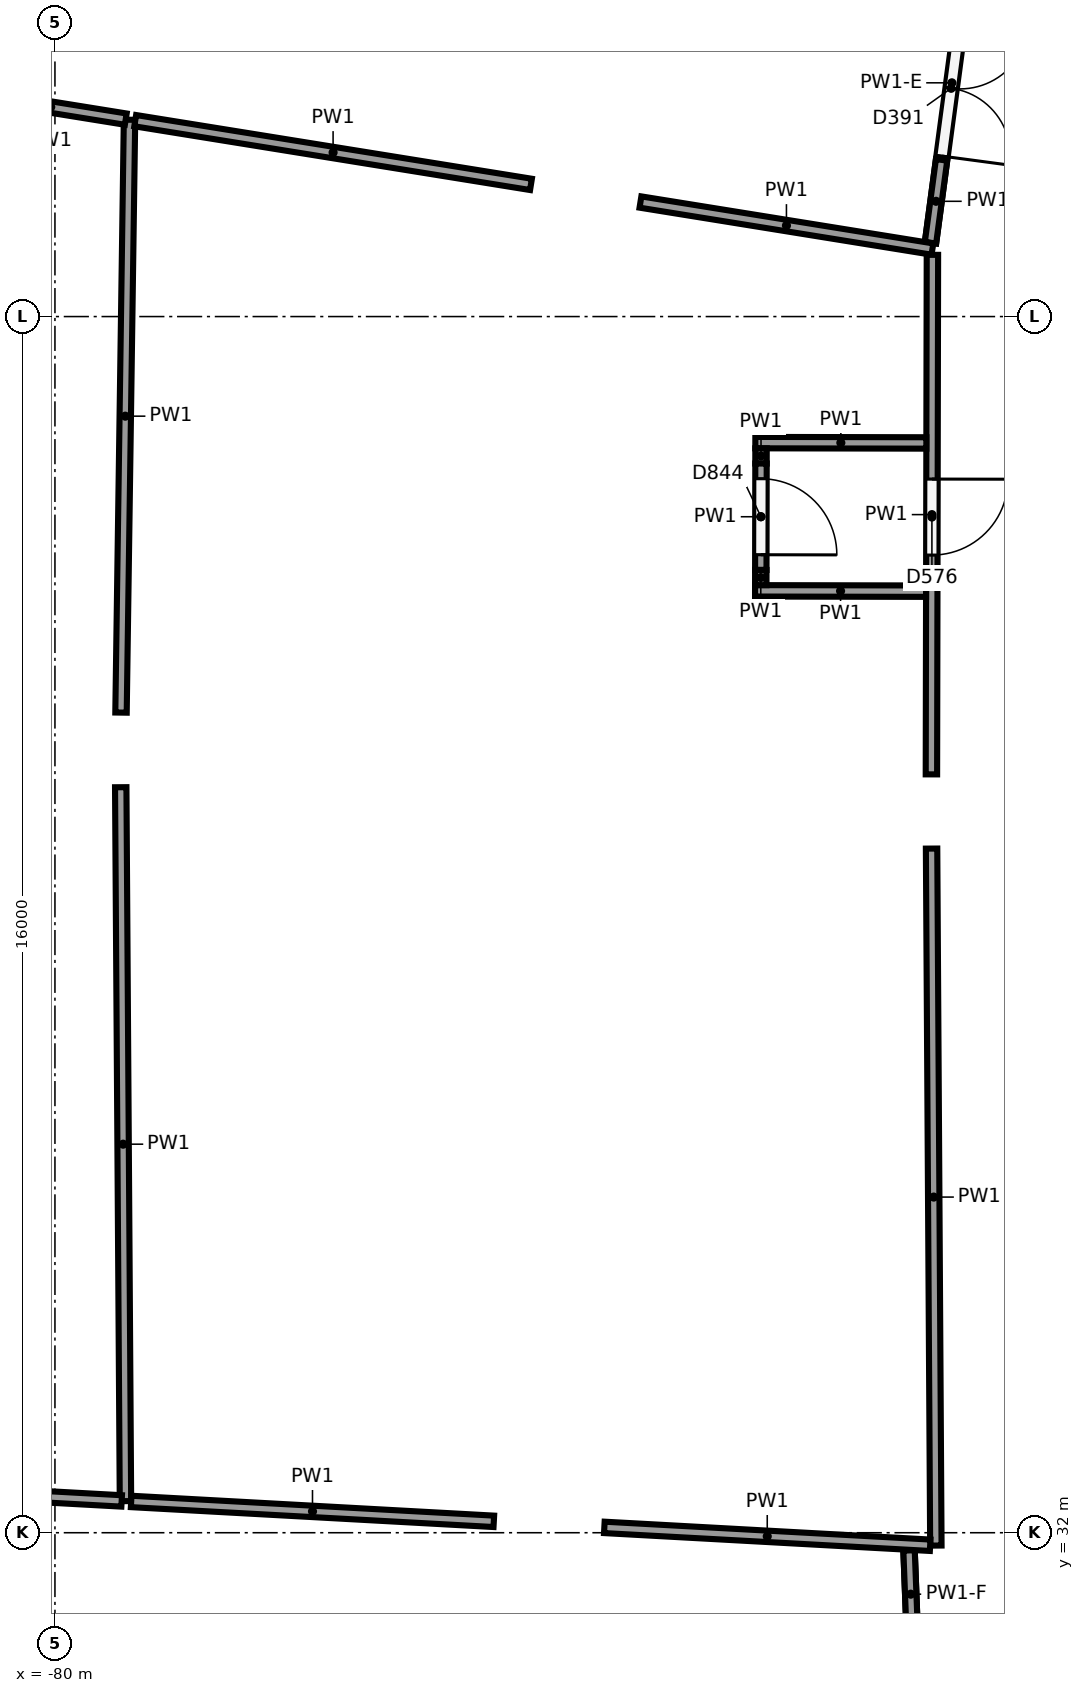
"""IFC4 building model, lengths in metres.
Left out: names, types, materials, properties, quantities, classifications, styles, units other than length and angle.
Written with IfcOpenShell. Run it as: python <this file> out.ifc"""

import sys

from ifc_helpers import new_model, si_unit, direction, frame, frame_2d, origin, origin_2d, place, context, subcontext, project, spatial, rectangle, circle, extrude, element, fill, save


model = new_model("IFC4")
c1 = context("Model", 3, precision=1e-05, world=origin(), true_north=direction((0.0, 1.0)))
c2 = subcontext(c1, "Body", "Model", "MODEL_VIEW")
j1 = project(units=[si_unit("LENGTHUNIT", "METRE"), si_unit("PLANEANGLEUNIT", "RADIAN")], contexts=[c1])
p1 = place(None, origin())
s1 = spatial("IfcSite", under=j1, at=p1, CompositionType="ELEMENT")
p2 = place(p1, origin())
s2 = spatial("IfcBuilding", under=s1, at=p2, CompositionType="ELEMENT")
p3 = place(p2, origin())
s3 = spatial("IfcBuildingStorey", under=s2, at=p3, CompositionType="ELEMENT", Elevation=0.0)
for number, where, z_axis, x_axis in (
    (1, (-72.992, 51.847, 0.0), (0.0, 0.0, 1.0), (1.0, 0.0, 0.0)),
    (2, (-73.405, 41.862, 0.0), (0.0, 0.0, 1.0), (1.0, 0.0, 0.0)),
):
    element("IfcColumn", number, at=place(p3, frame(where, z_axis=z_axis, x_axis=x_axis)), inside=s3, PredefinedType="COLUMN", context=c2, shape_type="SweptSolid", body=[
        extrude(circle(Radius=0.45, at=origin_2d()), origin(), (0.0, 0.0, 1.0), 6.5),
    ])
p4 = place(p3, frame((-79.072, 32.416, 0.0), z_axis=(0.0, 0.0, 1.0), x_axis=(-0.006628223816, 0.999978033083, 0.0)))
e3 = element("IfcWall", 3, at=p4, inside=s3, PredefinedType="PARTITIONING", context=c2, shape_type="SweptSolid", body=[
    extrude(rectangle(XDim=9.393, YDim=0.15, at=frame_2d((4.696, 0.0))), origin(), (0.0, 0.0, 1.0), 6.15),
])
p5 = place(p3, frame((-79.131, 42.79, 0.0), z_axis=(0.0, 0.0, 1.0), x_axis=(0.014366063558, 0.999896802784, 0.0)))
e4 = element("IfcWall", 4, at=p5, inside=s3, PredefinedType="PARTITIONING", context=c2, shape_type="SweptSolid", body=[
    extrude(rectangle(XDim=7.8, YDim=0.15, at=frame_2d((3.9, 0.0))), origin(), (0.0, 0.0, 1.0), 6.15),
])
p6 = place(p3, frame((-78.944, 50.577, 0.0), z_axis=(0.0, 0.0, 1.0), x_axis=(0.987278649512, -0.158999585591, 0.0)))
e5 = element("IfcWall", 5, at=p6, inside=s3, PredefinedType="PARTITIONING", context=c2, shape_type="SweptSolid", body=[
    extrude(rectangle(XDim=5.274, YDim=0.15, at=frame_2d((2.637, 0.0))), origin(), (0.0, 0.0, 1.0), 6.15),
])
p7 = place(p3, frame((-72.296, 49.507, 0.0), z_axis=(0.0, 0.0, 1.0), x_axis=(0.987278004814, -0.159003588674, 0.0)))
e6 = element("IfcWall", 6, at=p7, inside=s3, PredefinedType="PARTITIONING", context=c2, shape_type="SweptSolid", body=[
    extrude(rectangle(XDim=3.891, YDim=0.15, at=frame_2d((1.945, 0.0))), origin(), (0.0, 0.0, 1.0), 6.15),
])
p8 = place(p3, frame((-68.455, 48.812, 0.0), z_axis=(0.0, 0.0, 1.0), x_axis=(-0.001928774496, -0.999998139913, 0.0)))
e7 = element("IfcWall", 7, at=p8, inside=s3, PredefinedType="PARTITIONING", context=c2, shape_type="SweptSolid", body=[
    extrude(rectangle(XDim=6.835, YDim=0.15, at=frame_2d((3.417, 0.0))), origin(), (0.0, 0.0, 1.0), 6.15),
])
p9 = place(p8, frame((2.95, 0.0, 0.0)))
e8 = element("IfcOpeningElement", 8, at=p9, cuts=e7, PredefinedType="OPENING", context=c2, shape_type="SweptSolid", body=[
    extrude(rectangle(XDim=1.0, YDim=2.1, at=frame_2d((0.5, 1.05))), frame((0.0, 0.085, 0.0), z_axis=(0.0, -1.0, 0.0), x_axis=(1.0, 0.0, 0.0)), (0.0, 0.0, 1.0), 0.17),
])
p10 = place(p3, frame((-68.466, 41.001, 0.0), z_axis=(0.0, 0.0, 1.0), x_axis=(0.006150207172, -0.999981087297, 0.0)))
e9 = element("IfcWall", 9, at=p10, inside=s3, PredefinedType="PARTITIONING", context=c2, shape_type="SweptSolid", body=[
    extrude(rectangle(XDim=9.17, YDim=0.15, at=frame_2d((4.585, 0.0))), origin(), (0.0, 0.0, 1.0), 6.15),
])
p11 = place(p3, frame((-68.485, 31.835, 0.0), z_axis=(0.0, 0.0, 1.0), x_axis=(-0.99849947009, 0.054761375346, 0.0)))
e10 = element("IfcWall", 10, at=p11, inside=s3, PredefinedType="PARTITIONING", context=c2, shape_type="SweptSolid", body=[
    extrude(rectangle(XDim=4.293, YDim=0.15, at=frame_2d((2.146, 0.0))), origin(), (0.0, 0.0, 1.0), 6.15),
])
p12 = place(p3, frame((-74.226, 32.15, 0.0), z_axis=(0.0, 0.0, 1.0), x_axis=(-0.998499245292, 0.054765474083, 0.0)))
e11 = element("IfcWall", 11, at=p12, inside=s3, PredefinedType="PARTITIONING", context=c2, shape_type="SweptSolid", body=[
    extrude(rectangle(XDim=4.779, YDim=0.15, at=frame_2d((2.389, 0.0))), origin(), (0.0, 0.0, 1.0), 6.15),
])
p13 = place(p3, frame((-79.122, 32.418, 0.0), z_axis=(0.0, 0.0, 1.0), x_axis=(-0.998497362752, 0.05479978629, 0.0)))
e12 = element("IfcWall", 12, at=p13, inside=s3, PredefinedType="PARTITIONING", context=c2, shape_type="SweptSolid", body=[
    extrude(rectangle(XDim=2.481, YDim=0.15, at=frame_2d((1.241, 0.0))), origin(), (0.0, 0.0, 1.0), 6.15),
])
p14 = place(p3, frame((-81.043, 50.915, 0.0), z_axis=(0.0, 0.0, 1.0), x_axis=(0.987289357967, -0.158933079139, 0.0)))
e13 = element("IfcWall", 13, at=p14, inside=s3, PredefinedType="PARTITIONING", context=c2, shape_type="SweptSolid", body=[
    extrude(rectangle(XDim=2.0, YDim=0.15, at=frame_2d((1.0, 0.0))), origin(), (0.0, 0.0, 1.0), 6.15),
])
for number, where, z_axis, x_axis in (
    (14, (-68.535, 46.337, 0.0), (0.0, 0.0, 1.0), (-1.0, 0.002, 0.0)),
    (15, (-68.539, 44.387, 0.0), (0.0, 0.0, 1.0), (-1.0, 0.002, 0.0)),
):
    element("IfcWall", number, at=place(p3, frame(where, z_axis=z_axis, x_axis=x_axis)), inside=s3, PredefinedType="PARTITIONING", context=c2, shape_type="SweptSolid", body=[
        extrude(rectangle(XDim=2.25, YDim=0.15, at=frame_2d((1.125, 0.0))), origin(), (0.0, 0.0, 1.0), 6.15),
    ])
p15 = place(p3, frame((-70.71, 46.266, 0.0), z_axis=(0.0, 0.0, 1.0), x_axis=(-0.002441995161, -0.999997018325, 0.0)))
e16 = element("IfcWall", 16, at=p15, inside=s3, PredefinedType="PARTITIONING", context=c2, shape_type="SweptSolid", body=[
    extrude(rectangle(XDim=0.2, YDim=0.15, at=frame_2d((0.1, 0.0))), origin(), (0.0, 0.0, 1.0), 6.15),
])
p16 = place(p3, frame((-70.71, 46.066, 0.0), z_axis=(0.0, 0.0, 1.0), x_axis=(-0.001918378054, -0.999998159911, 0.0)))
e17 = element("IfcWall", 17, at=p16, inside=s3, PredefinedType="PARTITIONING", context=c2, shape_type="SweptSolid", body=[
    extrude(rectangle(XDim=1.4, YDim=0.15, at=frame_2d((0.7, 0.0))), origin(), (0.0, 0.0, 1.0), 6.15),
])
p17 = place(p16, frame((0.2, 0.0, 0.0)))
e18 = element("IfcOpeningElement", 18, at=p17, cuts=e17, PredefinedType="OPENING", context=c2, shape_type="SweptSolid", body=[
    extrude(rectangle(XDim=1.0, YDim=2.1, at=frame_2d((0.5, 1.05))), frame((0.0, 0.085, 0.0), z_axis=(0.0, -1.0, 0.0), x_axis=(1.0, 0.0, 0.0)), (0.0, 0.0, 1.0), 0.17),
])
p18 = place(p3, frame((-70.713, 44.667, 0.0), z_axis=(0.0, 0.0, 1.0), x_axis=(-0.001221000311, -0.999999254579, 0.0)))
e19 = element("IfcWall", 19, at=p18, inside=s3, PredefinedType="PARTITIONING", context=c2, shape_type="SweptSolid", body=[
    extrude(rectangle(XDim=0.2, YDim=0.15, at=frame_2d((0.1, 0.0))), origin(), (0.0, 0.0, 1.0), 6.15),
])
p19 = place(p3, frame((-67.917, 53.179, 0.0), z_axis=(0.0, 0.0, 1.0), x_axis=(-0.132608183306, -0.991168537495, 0.0)))
e20 = element("IfcWall", 20, at=p19, inside=s3, PredefinedType="PARTITIONING", context=c2, shape_type="SweptSolid", body=[
    extrude(rectangle(XDim=4.246, YDim=0.15, at=frame_2d((2.123, 0.0))), origin(), (0.0, 0.0, 1.0), 5.25),
])
p20 = place(p19, frame((1.295, 0.0, 0.0)))
e21 = element("IfcOpeningElement", 21, at=p20, cuts=e20, PredefinedType="OPENING", context=c2, shape_type="SweptSolid", body=[
    extrude(rectangle(XDim=1.8, YDim=2.1, at=frame_2d((0.9, 1.05))), frame((0.0, 0.085, 0.0), z_axis=(0.0, -1.0, 0.0), x_axis=(1.0, 0.0, 0.0)), (0.0, 0.0, 1.0), 0.17),
])
p21 = place(p3, frame((-68.335, 50.062, 5.25), z_axis=(0.0, 0.0, 1.0), x_axis=(-0.132498076065, -0.991183262489, 0.0)))
e22 = element("IfcWall", 22, at=p21, inside=s3, PredefinedType="PARTITIONING", context=c2, shape_type="SweptSolid", body=[
    extrude(rectangle(XDim=1.1, YDim=0.15, at=frame_2d((0.55, 0.0))), origin(), (0.0, 0.0, 1.0), 0.9),
])
p22 = place(p3, frame((-68.763, 31.767, 0.0), z_axis=(0.0, 0.0, 1.0), x_axis=(0.03852573289, -0.99925760838, 0.0)))
e23 = element("IfcWall", 23, at=p22, inside=s3, PredefinedType="PARTITIONING", context=c2, shape_type="SweptSolid", body=[
    extrude(rectangle(XDim=4.252, YDim=0.15, at=frame_2d((2.126, 0.0))), origin(), (0.0, 0.0, 1.0), 5.25),
])
p23 = place(p22, frame((1.202, 0.0, 0.0)))
e24 = element("IfcOpeningElement", 24, at=p23, cuts=e23, PredefinedType="OPENING", context=c2, shape_type="SweptSolid", body=[
    extrude(rectangle(XDim=1.8, YDim=2.1, at=frame_2d((0.9, 1.05))), frame((0.0, 0.085, 0.0), z_axis=(0.0, -1.0, 0.0), x_axis=(1.0, 0.0, 0.0)), (0.0, 0.0, 1.0), 0.17),
])
p24 = place(p3, frame((-68.763, 31.767, 5.25), z_axis=(0.0, 0.0, 1.0), x_axis=(0.03856332079, -0.999256158495, 0.0)))
e25 = element("IfcWall", 25, at=p24, inside=s3, PredefinedType="PARTITIONING", context=c2, shape_type="SweptSolid", body=[
    extrude(rectangle(XDim=1.152, YDim=0.15, at=frame_2d((0.576, 0.0))), origin(), (0.0, 0.0, 1.0), 0.9),
])
p25 = place(p9, origin())
e26 = element("IfcDoor", 26, at=p25, inside=s3, OperationType="SINGLE_SWING_LEFT", PredefinedType="DOOR", context=c2, shape_type="SweptSolid", body=[
    extrude(rectangle(XDim=1.0, YDim=2.1, at=frame_2d((0.5, 1.05))), frame((0.0, 0.025, 0.0), z_axis=(0.0, -1.0, 0.0), x_axis=(1.0, 0.0, 0.0)), (0.0, 0.0, 1.0), 0.05),
])
fill(e8, e26)
p26 = place(p17, origin())
e27 = element("IfcDoor", 27, at=p26, inside=s3, OperationType="SINGLE_SWING_RIGHT", PredefinedType="DOOR", context=c2, shape_type="SweptSolid", body=[
    extrude(rectangle(XDim=1.0, YDim=2.1, at=frame_2d((0.5, 1.05))), frame((0.0, 0.025, 0.0), z_axis=(0.0, -1.0, 0.0), x_axis=(1.0, 0.0, 0.0)), (0.0, 0.0, 1.0), 0.05),
])
fill(e18, e27)
p27 = place(p20, origin())
e28 = element("IfcDoor", 28, at=p27, inside=s3, OperationType="DOUBLE_DOOR_SINGLE_SWING", PredefinedType="DOOR", context=c2, shape_type="SweptSolid", body=[
    extrude(rectangle(XDim=1.8, YDim=2.1, at=frame_2d((0.9, 1.05))), frame((0.0, 0.025, 0.0), z_axis=(0.0, -1.0, 0.0), x_axis=(1.0, 0.0, 0.0)), (0.0, 0.0, 1.0), 0.05),
])
fill(e21, e28)
save(model, sys.argv[1])
